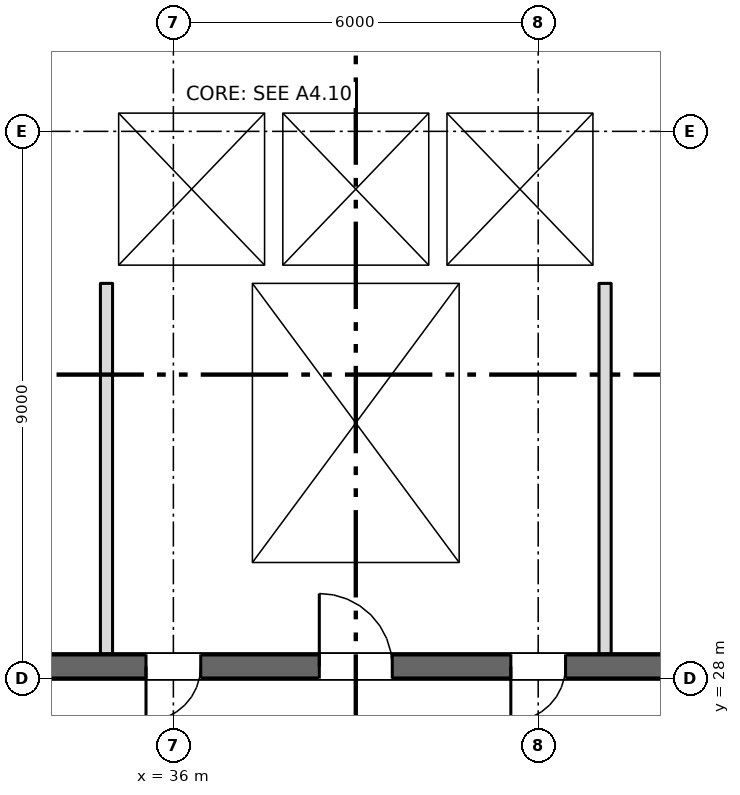
"""IFC4 building model, lengths in metres.
Left out: names, types, materials, properties, quantities, classifications, styles, units other than length and angle.
Written with IfcOpenShell. Run it as: python <this file> out.ifc"""

import sys

from ifc_helpers import new_model, si_unit, direction, frame, frame_2d, origin, place, context, subcontext, project, spatial, rectangle, extrude, element, fill, save


model = new_model("IFC4")
c1 = context("Model", 3, precision=1e-05, world=origin(), true_north=direction((0.0, 1.0)))
c2 = subcontext(c1, "Body", "Model", "MODEL_VIEW")
j1 = project(units=[si_unit("LENGTHUNIT", "METRE"), si_unit("PLANEANGLEUNIT", "RADIAN")], contexts=[c1])
p1 = place(None, origin())
s1 = spatial("IfcSite", under=j1, at=p1, CompositionType="ELEMENT")
p2 = place(p1, origin())
s2 = spatial("IfcBuilding", under=s1, at=p2, CompositionType="ELEMENT")
p3 = place(p2, frame((0.0, 0.0, 56.25)))
s3 = spatial("IfcBuildingStorey", under=s2, at=p3, CompositionType="ELEMENT", Elevation=56.25)
p4 = place(p3, frame((6.7, 28.2, 0.0), z_axis=(0.0, 0.0, 1.0), x_axis=(1.0, 0.0, 0.0)))
e1 = element("IfcWall", 1, at=p4, inside=s3, PredefinedType="SHEAR", context=c2, shape_type="SweptSolid", body=[
    extrude(rectangle(XDim=57.8, YDim=0.4, at=frame_2d((28.9, 0.0))), origin(), (0.0, 0.0, 1.0), 3.35),
])
p5 = place(p4, frame((13.85, 0.0, 0.0)))
e2 = element("IfcOpeningElement", 2, at=p5, cuts=e1, PredefinedType="OPENING", context=c2, shape_type="SweptSolid", body=[
    extrude(rectangle(XDim=0.9, YDim=2.1, at=frame_2d((0.45, 1.05))), frame((0.0, 0.21, 0.0), z_axis=(0.0, -1.0, 0.0), x_axis=(1.0, 0.0, 0.0)), (0.0, 0.0, 1.0), 0.42),
])
p6 = place(p4, frame((48.562, 0.0, 0.0)))
e3 = element("IfcOpeningElement", 3, at=p6, cuts=e1, PredefinedType="OPENING", context=c2, shape_type="SweptSolid", body=[
    extrude(rectangle(XDim=0.9, YDim=2.1, at=frame_2d((0.45, 1.05))), frame((0.0, 0.21, 0.0), z_axis=(0.0, -1.0, 0.0), x_axis=(1.0, 0.0, 0.0)), (0.0, 0.0, 1.0), 0.42),
])
p7 = place(p4, frame((51.137, 0.0, 0.0)))
e4 = element("IfcOpeningElement", 4, at=p7, cuts=e1, PredefinedType="OPENING", context=c2, shape_type="SweptSolid", body=[
    extrude(rectangle(XDim=0.9, YDim=2.1, at=frame_2d((0.45, 1.05))), frame((0.0, 0.21, 0.0), z_axis=(0.0, -1.0, 0.0), x_axis=(1.0, 0.0, 0.0)), (0.0, 0.0, 1.0), 0.42),
])
p8 = place(p4, frame((1.35, 0.0, 0.0)))
e5 = element("IfcOpeningElement", 5, at=p8, cuts=e1, PredefinedType="OPENING", context=c2, shape_type="SweptSolid", body=[
    extrude(rectangle(XDim=0.9, YDim=2.1, at=frame_2d((0.45, 1.05))), frame((0.0, 0.21, 0.0), z_axis=(0.0, -1.0, 0.0), x_axis=(1.0, 0.0, 0.0)), (0.0, 0.0, 1.0), 0.42),
])
p9 = place(p4, frame((4.7, 0.0, 0.0)))
e6 = element("IfcOpeningElement", 6, at=p9, cuts=e1, PredefinedType="OPENING", context=c2, shape_type="SweptSolid", body=[
    extrude(rectangle(XDim=1.2, YDim=2.1, at=frame_2d((0.6, 1.05))), frame((0.0, 0.21, 0.0), z_axis=(0.0, -1.0, 0.0), x_axis=(1.0, 0.0, 0.0)), (0.0, 0.0, 1.0), 0.42),
])
p10 = place(p4, frame((31.7, 0.0, 0.0)))
e7 = element("IfcOpeningElement", 7, at=p10, cuts=e1, PredefinedType="OPENING", context=c2, shape_type="SweptSolid", body=[
    extrude(rectangle(XDim=1.2, YDim=2.1, at=frame_2d((0.6, 1.05))), frame((0.0, 0.21, 0.0), z_axis=(0.0, -1.0, 0.0), x_axis=(1.0, 0.0, 0.0)), (0.0, 0.0, 1.0), 0.42),
])
p11 = place(p4, frame((55.2, 0.0, 0.0)))
e8 = element("IfcOpeningElement", 8, at=p11, cuts=e1, PredefinedType="OPENING", context=c2, shape_type="SweptSolid", body=[
    extrude(rectangle(XDim=1.2, YDim=2.1, at=frame_2d((0.6, 1.05))), frame((0.0, 0.21, 0.0), z_axis=(0.0, -1.0, 0.0), x_axis=(1.0, 0.0, 0.0)), (0.0, 0.0, 1.0), 0.42),
])
p12 = place(p4, frame((21.7, 0.0, 0.0)))
e9 = element("IfcOpeningElement", 9, at=p12, cuts=e1, PredefinedType="OPENING", context=c2, shape_type="SweptSolid", body=[
    extrude(rectangle(XDim=1.2, YDim=2.1, at=frame_2d((0.6, 1.05))), frame((0.0, 0.21, 0.0), z_axis=(0.0, -1.0, 0.0), x_axis=(1.0, 0.0, 0.0)), (0.0, 0.0, 1.0), 0.42),
])
p13 = place(p4, frame((41.7, 0.0, 0.0)))
e10 = element("IfcOpeningElement", 10, at=p13, cuts=e1, PredefinedType="OPENING", context=c2, shape_type="SweptSolid", body=[
    extrude(rectangle(XDim=1.2, YDim=2.1, at=frame_2d((0.6, 1.05))), frame((0.0, 0.21, 0.0), z_axis=(0.0, -1.0, 0.0), x_axis=(1.0, 0.0, 0.0)), (0.0, 0.0, 1.0), 0.42),
])
p14 = place(p4, frame((24.85, 0.0, 0.0)))
e11 = element("IfcOpeningElement", 11, at=p14, cuts=e1, PredefinedType="OPENING", context=c2, shape_type="SweptSolid", body=[
    extrude(rectangle(XDim=2.4, YDim=2.1, at=frame_2d((1.2, 1.05))), frame((0.0, 0.21, 0.0), z_axis=(0.0, -1.0, 0.0), x_axis=(1.0, 0.0, 0.0)), (0.0, 0.0, 1.0), 0.42),
])
p15 = place(p4, frame((37.35, 0.0, 0.0)))
e12 = element("IfcOpeningElement", 12, at=p15, cuts=e1, PredefinedType="OPENING", context=c2, shape_type="SweptSolid", body=[
    extrude(rectangle(XDim=2.4, YDim=2.1, at=frame_2d((1.2, 1.05))), frame((0.0, 0.21, 0.0), z_axis=(0.0, -1.0, 0.0), x_axis=(1.0, 0.0, 0.0)), (0.0, 0.0, 1.0), 0.42),
])
p16 = place(p4, frame((7.85, 0.0, 0.0)))
e13 = element("IfcOpeningElement", 13, at=p16, cuts=e1, PredefinedType="OPENING", context=c2, shape_type="SweptSolid", body=[
    extrude(rectangle(XDim=2.4, YDim=2.1, at=frame_2d((1.2, 1.05))), frame((0.0, 0.21, 0.0), z_axis=(0.0, -1.0, 0.0), x_axis=(1.0, 0.0, 0.0)), (0.0, 0.0, 1.0), 0.42),
])
p17 = place(p4, frame((28.85, 0.0, 0.0)))
e14 = element("IfcOpeningElement", 14, at=p17, cuts=e1, PredefinedType="OPENING", context=c2, shape_type="SweptSolid", body=[
    extrude(rectangle(XDim=0.9, YDim=2.1, at=frame_2d((0.45, 1.05))), frame((0.0, 0.21, 0.0), z_axis=(0.0, -1.0, 0.0), x_axis=(1.0, 0.0, 0.0)), (0.0, 0.0, 1.0), 0.42),
])
p18 = place(p4, frame((34.85, 0.0, 0.0)))
e15 = element("IfcOpeningElement", 15, at=p18, cuts=e1, PredefinedType="OPENING", context=c2, shape_type="SweptSolid", body=[
    extrude(rectangle(XDim=0.9, YDim=2.1, at=frame_2d((0.45, 1.05))), frame((0.0, 0.21, 0.0), z_axis=(0.0, -1.0, 0.0), x_axis=(1.0, 0.0, 0.0)), (0.0, 0.0, 1.0), 0.42),
])
for number, where, z_axis, x_axis in (
    (16, (37.15, 28.4, 0.0), (0.0, 0.0, 1.0), (0.0, 1.0, 0.0)),
    (17, (40.85, 28.4, 0.0), (0.0, 0.0, 1.0), (0.0, 1.0, 0.0)),
):
    element("IfcWall", number, at=place(p3, frame(where, z_axis=z_axis, x_axis=x_axis)), inside=s3, PredefinedType="SHEAR", context=c2, shape_type="SweptSolid", body=[
        extrude(rectangle(XDim=6.1, YDim=0.3, at=frame_2d((3.05, 0.0))), origin(), (0.0, 0.0, 1.0), 3.35),
    ])
p19 = place(p3, frame((34.8, 34.65, 0.0), z_axis=(0.0, 0.0, 1.0), x_axis=(1.0, 0.0, 0.0)))
e18 = element("IfcWall", 18, at=p19, inside=s3, PredefinedType="SHEAR", context=c2, shape_type="SweptSolid", body=[
    extrude(rectangle(XDim=8.4, YDim=0.3, at=frame_2d((4.2, 0.0))), origin(), (0.0, 0.0, 1.0), 3.35),
])
p20 = place(p3, frame((34.8, 37.45, 0.0), z_axis=(0.0, 0.0, 1.0), x_axis=(1.0, 0.0, 0.0)))
e19 = element("IfcWall", 19, at=p20, inside=s3, PredefinedType="SHEAR", context=c2, shape_type="SweptSolid", body=[
    extrude(rectangle(XDim=8.4, YDim=0.3, at=frame_2d((4.2, 0.0))), origin(), (0.0, 0.0, 1.0), 3.35),
])
p21 = place(p20, frame((0.95, 0.0, 0.0)))
e20 = element("IfcOpeningElement", 20, at=p21, cuts=e19, PredefinedType="OPENING", context=c2, shape_type="SweptSolid", body=[
    extrude(rectangle(XDim=1.1, YDim=2.1, at=frame_2d((0.55, 1.05))), frame((0.0, 0.16, 0.0), z_axis=(0.0, -1.0, 0.0), x_axis=(1.0, 0.0, 0.0)), (0.0, 0.0, 1.0), 0.32),
])
p22 = place(p20, frame((3.65, 0.0, 0.0)))
e21 = element("IfcOpeningElement", 21, at=p22, cuts=e19, PredefinedType="OPENING", context=c2, shape_type="SweptSolid", body=[
    extrude(rectangle(XDim=1.1, YDim=2.1, at=frame_2d((0.55, 1.05))), frame((0.0, 0.16, 0.0), z_axis=(0.0, -1.0, 0.0), x_axis=(1.0, 0.0, 0.0)), (0.0, 0.0, 1.0), 0.32),
])
p23 = place(p20, frame((6.35, 0.0, 0.0)))
e22 = element("IfcOpeningElement", 22, at=p23, cuts=e19, PredefinedType="OPENING", context=c2, shape_type="SweptSolid", body=[
    extrude(rectangle(XDim=1.1, YDim=2.1, at=frame_2d((0.55, 1.05))), frame((0.0, 0.16, 0.0), z_axis=(0.0, -1.0, 0.0), x_axis=(1.0, 0.0, 0.0)), (0.0, 0.0, 1.0), 0.32),
])
for number, where, z_axis, x_axis in (
    (23, (34.95, 34.8, 0.0), (0.0, 0.0, 1.0), (0.0, 1.0, 0.0)),
    (24, (43.05, 34.8, 0.0), (0.0, 0.0, 1.0), (0.0, 1.0, 0.0)),
    (25, (37.65, 34.8, 0.0), (0.0, 0.0, 1.0), (0.0, 1.0, 0.0)),
    (26, (40.35, 34.8, 0.0), (0.0, 0.0, 1.0), (0.0, 1.0, 0.0)),
):
    element("IfcWall", number, at=place(p3, frame(where, z_axis=z_axis, x_axis=x_axis)), inside=s3, PredefinedType="SHEAR", context=c2, shape_type="SweptSolid", body=[
        extrude(rectangle(XDim=2.5, YDim=0.3, at=frame_2d((1.25, 0.0))), origin(), (0.0, 0.0, 1.0), 3.35),
    ])
for number, where, z_axis, x_axis in (
    (27, (34.9, 28.4, 0.0), (0.0, 0.0, 1.0), (0.0, 1.0, 0.0)),
    (28, (43.1, 28.4, 0.0), (0.0, 0.0, 1.0), (0.0, 1.0, 0.0)),
):
    element("IfcWall", number, at=place(p3, frame(where, z_axis=z_axis, x_axis=x_axis)), inside=s3, PredefinedType="PARTITIONING", context=c2, shape_type="SweptSolid", body=[
        extrude(rectangle(XDim=6.1, YDim=0.2, at=frame_2d((3.05, 0.0))), origin(), (0.0, 0.0, 1.0), 3.35),
    ])
p24 = place(p21, origin())
e29 = element("IfcDoor", 29, at=p24, inside=s3, OperationType="SLIDING_TO_LEFT", PredefinedType="DOOR", context=c2, shape_type="SweptSolid", body=[
    extrude(rectangle(XDim=1.1, YDim=2.1, at=frame_2d((0.55, 1.05))), frame((0.0, 0.025, 0.0), z_axis=(0.0, -1.0, 0.0), x_axis=(1.0, 0.0, 0.0)), (0.0, 0.0, 1.0), 0.05),
])
fill(e20, e29)
p25 = place(p22, origin())
e30 = element("IfcDoor", 30, at=p25, inside=s3, OperationType="SLIDING_TO_LEFT", PredefinedType="DOOR", context=c2, shape_type="SweptSolid", body=[
    extrude(rectangle(XDim=1.1, YDim=2.1, at=frame_2d((0.55, 1.05))), frame((0.0, 0.025, 0.0), z_axis=(0.0, -1.0, 0.0), x_axis=(1.0, 0.0, 0.0)), (0.0, 0.0, 1.0), 0.05),
])
fill(e21, e30)
p26 = place(p23, origin())
e31 = element("IfcDoor", 31, at=p26, inside=s3, OperationType="SLIDING_TO_LEFT", PredefinedType="DOOR", context=c2, shape_type="SweptSolid", body=[
    extrude(rectangle(XDim=1.1, YDim=2.1, at=frame_2d((0.55, 1.05))), frame((0.0, 0.025, 0.0), z_axis=(0.0, -1.0, 0.0), x_axis=(1.0, 0.0, 0.0)), (0.0, 0.0, 1.0), 0.05),
])
fill(e22, e31)
p27 = place(p10, origin())
e32 = element("IfcDoor", 32, at=p27, inside=s3, OperationType="SINGLE_SWING_LEFT", PredefinedType="DOOR", context=c2, shape_type="SweptSolid", body=[
    extrude(rectangle(XDim=1.2, YDim=2.1, at=frame_2d((0.6, 1.05))), frame((0.0, 0.025, 0.0), z_axis=(0.0, -1.0, 0.0), x_axis=(1.0, 0.0, 0.0)), (0.0, 0.0, 1.0), 0.05),
])
fill(e7, e32)
p28 = place(p17, origin())
e33 = element("IfcDoor", 33, at=p28, inside=s3, OperationType="SINGLE_SWING_LEFT", PredefinedType="DOOR", context=c2, shape_type="SweptSolid", body=[
    extrude(rectangle(XDim=0.9, YDim=2.1, at=frame_2d((0.45, 1.05))), frame((0.0, 0.025, 0.0), z_axis=(0.0, -1.0, 0.0), x_axis=(1.0, 0.0, 0.0)), (0.0, 0.0, 1.0), 0.05),
])
fill(e14, e33)
p29 = place(p18, origin())
e34 = element("IfcDoor", 34, at=p29, inside=s3, OperationType="SINGLE_SWING_LEFT", PredefinedType="DOOR", context=c2, shape_type="SweptSolid", body=[
    extrude(rectangle(XDim=0.9, YDim=2.1, at=frame_2d((0.45, 1.05))), frame((0.0, 0.025, 0.0), z_axis=(0.0, -1.0, 0.0), x_axis=(1.0, 0.0, 0.0)), (0.0, 0.0, 1.0), 0.05),
])
fill(e15, e34)
save(model, sys.argv[1])
